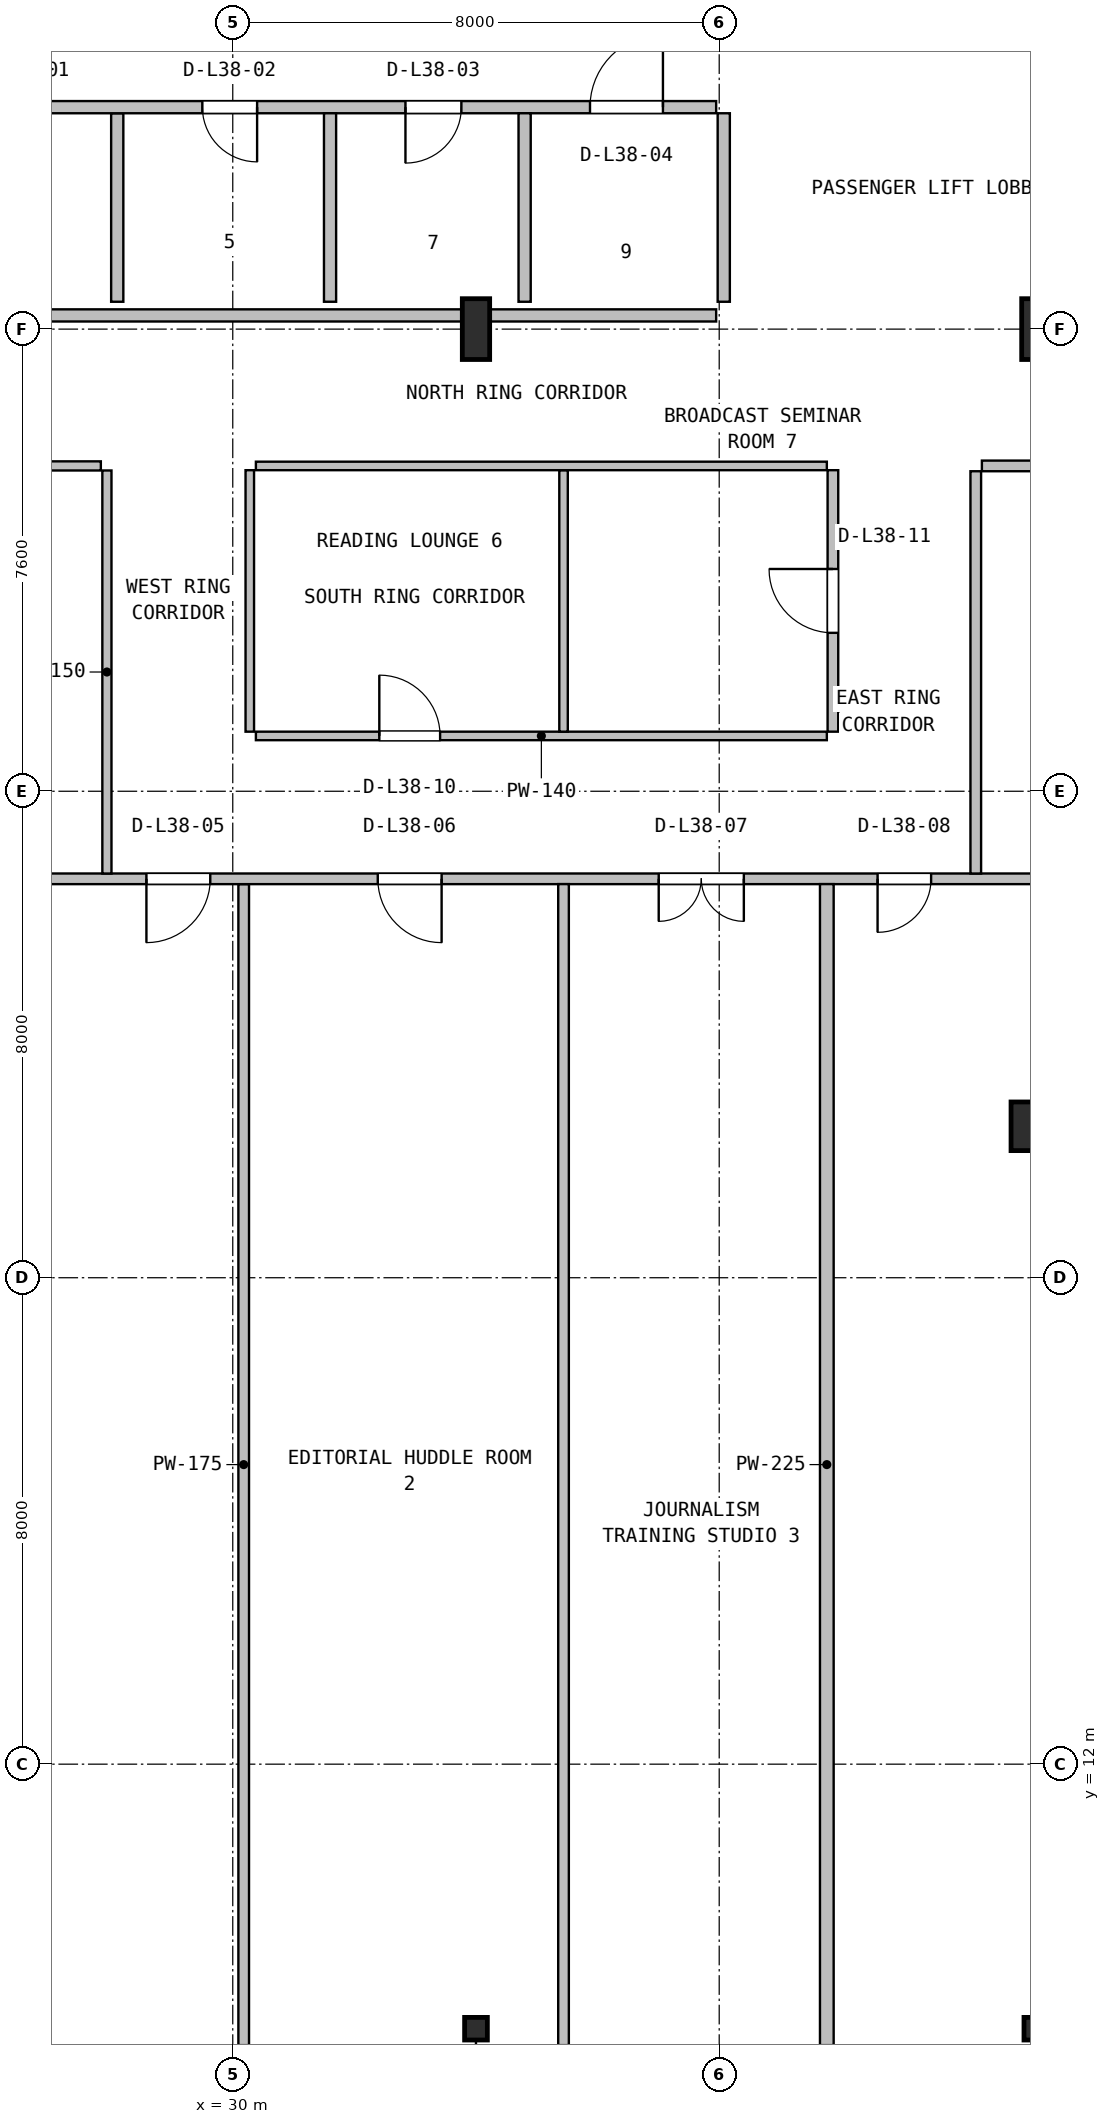
"""IFC4 building model, lengths in metres.
Left out: names, types, materials, properties, quantities, classifications, styles, units other than length and angle.
Written with IfcOpenShell. Run it as: python <this file> out.ifc"""

import sys

from ifc_helpers import new_model, si_unit, direction, frame, frame_2d, origin, origin_2d, place, context, subcontext, project, spatial, rectangle, i_section, extrude, source, transform, mapped, element, fill, save


model = new_model("IFC4")
c1 = context("Model", 3, precision=1e-05, world=origin(), true_north=direction((0.0, 1.0)))
c2 = subcontext(c1, "Body", "Model", "MODEL_VIEW")
j1 = project(units=[si_unit("LENGTHUNIT", "METRE"), si_unit("PLANEANGLEUNIT", "RADIAN")], contexts=[c1])
p1 = place(None, origin())
s1 = spatial("IfcSite", under=j1, at=p1, CompositionType="ELEMENT")
p2 = place(p1, origin())
s2 = spatial("IfcBuilding", under=s1, at=p2, CompositionType="ELEMENT")
p3 = place(p2, frame((0.0, 0.0, 157.2)))
s3 = spatial("IfcBuildingStorey", under=s2, at=p3, CompositionType="ELEMENT", Elevation=157.2)
m1 = source(origin(), c2, "Body", "SweptSolid", [
    extrude(i_section(OverallWidth=0.45, OverallDepth=1.0, WebThickness=0.016, FlangeThickness=0.03, FilletRadius=0.016, at=origin_2d()), origin(), (0.0, 0.0, 1.0), 3.8),
])
for number, where, z_axis, x_axis in (
    (1, (34.0, 35.6, 0.0), (0.0, 0.0, 1.0), (1.0, 0.0, 0.0)),
    (2, (43.2, 35.6, 0.0), (0.0, 0.0, 1.0), (1.0, 0.0, 0.0)),
):
    element("IfcColumn", number, at=place(p3, frame(where, z_axis=z_axis, x_axis=x_axis)), inside=s3, PredefinedType="COLUMN", context=c2, shape_type="MappedRepresentation", body=[
        mapped(m1, transform((0.0, 0.0, 0.0), x_axis=(1.0, 0.0, 0.0), y_axis=(0.0, 1.0, 0.0), z_axis=(0.0, 0.0, 1.0), scale=1.0)),
    ])
m2 = source(origin(), c2, "Body", "SweptSolid", [
    extrude(i_section(OverallWidth=0.374, OverallDepth=0.372, WebThickness=0.016, FlangeThickness=0.026, FilletRadius=0.016, at=origin_2d()), origin(), (0.0, 0.0, 1.0), 3.8),
])
for number, where, z_axis, x_axis in (
    (3, (34.0, 7.65, 0.0), (0.0, 0.0, 1.0), (1.0, 0.0, 0.0)),
    (4, (43.2, 7.65, 0.0), (0.0, 0.0, 1.0), (1.0, 0.0, 0.0)),
):
    element("IfcColumn", number, at=place(p3, frame(where, z_axis=z_axis, x_axis=x_axis)), inside=s3, PredefinedType="COLUMN", context=c2, shape_type="MappedRepresentation", body=[
        mapped(m2, transform((0.0, 0.0, 0.0), x_axis=(1.0, 0.0, 0.0), y_axis=(0.0, 1.0, 0.0), z_axis=(0.0, 0.0, 1.0), scale=1.0)),
    ])
m3 = source(origin(), c2, "Body", "SweptSolid", [
    extrude(rectangle(XDim=0.8, YDim=0.8, at=origin_2d()), origin(), (0.0, 0.0, 1.0), 3.8),
])
p4 = place(p3, frame((43.2, 22.49, 0.0), z_axis=(0.0, 0.0, 1.0), x_axis=(1.0, 0.0, 0.0)))
e5 = element("IfcColumn", 5, at=p4, inside=s3, PredefinedType="COLUMN", context=c2, shape_type="MappedRepresentation", body=[
    mapped(m3, transform((0.0, 0.0, 0.0), x_axis=(1.0, 0.0, 0.0), y_axis=(0.0, 1.0, 0.0), z_axis=(0.0, 0.0, 1.0), scale=1.0)),
])
p5 = place(p3, frame((25.0, 35.825, 0.0), z_axis=(0.0, 0.0, 1.0), x_axis=(1.0, 0.0, 0.0)))
e6 = element("IfcWall", 6, at=p5, inside=s3, PredefinedType="SOLIDWALL", context=c2, shape_type="SweptSolid", body=[
    extrude(rectangle(XDim=12.95, YDim=0.2, at=frame_2d((6.475, 0.0))), origin(), (0.0, 0.0, 1.0), 2.575),
])
p6 = place(p3, frame((28.1, 36.05, 0.0), z_axis=(0.0, 0.0, 1.0), x_axis=(0.0, 1.0, 0.0)))
e7 = element("IfcWall", 7, at=p6, inside=s3, PredefinedType="PLUMBINGWALL", context=c2, shape_type="SweptSolid", body=[
    extrude(rectangle(XDim=3.1, YDim=0.2, at=frame_2d((1.55, 0.0))), origin(), (0.0, 0.0, 1.0), 3.53),
])
p7 = place(p3, frame((25.0, 39.25, 0.0), z_axis=(0.0, 0.0, 1.0), x_axis=(1.0, 0.0, 0.0)))
e8 = element("IfcWall", 8, at=p7, inside=s3, PredefinedType="SOLIDWALL", context=c2, shape_type="SweptSolid", body=[
    extrude(rectangle(XDim=12.95, YDim=0.2, at=frame_2d((6.475, 0.0))), origin(), (0.0, 0.0, 1.0), 3.53),
])
p8 = place(p7, frame((1.1, 0.0, 0.0)))
e9 = element("IfcOpeningElement", 9, at=p8, cuts=e8, PredefinedType="OPENING", context=c2, shape_type="SweptSolid", body=[
    extrude(rectangle(XDim=0.9, YDim=2.06, at=frame_2d((0.45, 1.03))), frame((0.0, 0.11, 0.0), z_axis=(0.0, -1.0, 0.0), x_axis=(1.0, 0.0, 0.0)), (0.0, 0.0, 1.0), 0.22),
])
p9 = place(p7, frame((4.5, 0.0, 0.0)))
e10 = element("IfcOpeningElement", 10, at=p9, cuts=e8, PredefinedType="OPENING", context=c2, shape_type="SweptSolid", body=[
    extrude(rectangle(XDim=0.9, YDim=2.06, at=frame_2d((0.45, 1.03))), frame((0.0, 0.11, 0.0), z_axis=(0.0, -1.0, 0.0), x_axis=(1.0, 0.0, 0.0)), (0.0, 0.0, 1.0), 0.22),
])
p10 = place(p7, frame((7.84, 0.0, 0.0)))
e11 = element("IfcOpeningElement", 11, at=p10, cuts=e8, PredefinedType="OPENING", context=c2, shape_type="SweptSolid", body=[
    extrude(rectangle(XDim=0.92, YDim=2.08, at=frame_2d((0.46, 1.04))), frame((0.0, 0.11, 0.0), z_axis=(0.0, -1.0, 0.0), x_axis=(1.0, 0.0, 0.0)), (0.0, 0.0, 1.0), 0.22),
])
p11 = place(p7, frame((10.875, 0.0, 0.0)))
e12 = element("IfcOpeningElement", 12, at=p11, cuts=e8, PredefinedType="OPENING", context=c2, shape_type="SweptSolid", body=[
    extrude(rectangle(XDim=1.2, YDim=2.1, at=frame_2d((0.6, 1.05))), frame((0.0, 0.11, 0.0), z_axis=(0.0, -1.0, 0.0), x_axis=(1.0, 0.0, 0.0)), (0.0, 0.0, 1.0), 0.22),
])
p12 = place(p3, frame((31.6, 36.05, 0.0), z_axis=(0.0, 0.0, 1.0), x_axis=(0.0, 1.0, 0.0)))
e13 = element("IfcWall", 13, at=p12, inside=s3, PredefinedType="PLUMBINGWALL", context=c2, shape_type="SweptSolid", body=[
    extrude(rectangle(XDim=3.1, YDim=0.2, at=frame_2d((1.55, 0.0))), origin(), (0.0, 0.0, 1.0), 3.53),
])
for number, where, z_axis, x_axis in (
    (14, (34.8, 36.05, 0.0), (0.0, 0.0, 1.0), (0.0, 1.0, 0.0)),
    (15, (38.075, 36.05, 0.0), (0.0, 0.0, 1.0), (0.0, 1.0, 0.0)),
):
    element("IfcWall", number, at=place(p3, frame(where, z_axis=z_axis, x_axis=x_axis)), inside=s3, PredefinedType="SOLIDWALL", context=c2, shape_type="SweptSolid", body=[
        extrude(rectangle(XDim=3.1, YDim=0.2, at=frame_2d((1.55, 0.0))), origin(), (0.0, 0.0, 1.0), 3.53),
    ])
p13 = place(p3, frame((30.18, 7.38, 0.0), z_axis=(0.0, 0.0, 1.0), x_axis=(0.0, 1.0, 0.0)))
e16 = element("IfcWall", 16, at=p13, inside=s3, PredefinedType="PARTITIONING", context=c2, shape_type="SweptSolid", body=[
    extrude(rectangle(XDim=19.093, YDim=0.175, at=frame_2d((9.546, 0.0))), origin(), (0.0, 0.0, 1.0), 2.909),
])
p14 = place(p3, frame((7.18, 26.56, 0.0), z_axis=(0.0, 0.0, 1.0), x_axis=(1.0, 0.0, 0.0)))
e17 = element("IfcWall", 17, at=p14, inside=s3, PredefinedType="PARTITIONING", context=c2, shape_type="SweptSolid", body=[
    extrude(rectangle(XDim=53.64, YDim=0.175, at=frame_2d((26.82, 0.0))), origin(), (0.0, 0.0, 1.0), 2.909),
])
p15 = place(p14, frame((21.4, 0.0, 0.0)))
e18 = element("IfcOpeningElement", 18, at=p15, cuts=e17, PredefinedType="OPENING", context=c2, shape_type="SweptSolid", body=[
    extrude(rectangle(XDim=1.05, YDim=2.1, at=frame_2d((0.525, 1.05))), frame((0.0, 0.098, 0.0), z_axis=(0.0, -1.0, 0.0), x_axis=(1.0, 0.0, 0.0)), (0.0, 0.0, 1.0), 0.195),
])
p16 = place(p14, frame((25.205, 0.0, 0.0)))
e19 = element("IfcOpeningElement", 19, at=p16, cuts=e17, PredefinedType="OPENING", context=c2, shape_type="SweptSolid", body=[
    extrude(rectangle(XDim=1.05, YDim=2.1, at=frame_2d((0.525, 1.05))), frame((0.0, 0.098, 0.0), z_axis=(0.0, -1.0, 0.0), x_axis=(1.0, 0.0, 0.0)), (0.0, 0.0, 1.0), 0.195),
])
p17 = place(p14, frame((29.825, 0.0, 0.0)))
e20 = element("IfcOpeningElement", 20, at=p17, cuts=e17, PredefinedType="OPENING", context=c2, shape_type="SweptSolid", body=[
    extrude(rectangle(XDim=1.4, YDim=2.12, at=frame_2d((0.7, 1.06))), frame((0.0, 0.098, 0.0), z_axis=(0.0, -1.0, 0.0), x_axis=(1.0, 0.0, 0.0)), (0.0, 0.0, 1.0), 0.195),
])
p18 = place(p14, frame((33.425, 0.0, 0.0)))
e21 = element("IfcOpeningElement", 21, at=p18, cuts=e17, PredefinedType="OPENING", context=c2, shape_type="SweptSolid", body=[
    extrude(rectangle(XDim=0.88, YDim=2.06, at=frame_2d((0.44, 1.03))), frame((0.0, 0.098, 0.0), z_axis=(0.0, -1.0, 0.0), x_axis=(1.0, 0.0, 0.0)), (0.0, 0.0, 1.0), 0.195),
])
p19 = place(p3, frame((35.44, 7.38, 0.0), z_axis=(0.0, 0.0, 1.0), x_axis=(0.0, 1.0, 0.0)))
e22 = element("IfcWall", 22, at=p19, inside=s3, PredefinedType="PARTITIONING", context=c2, shape_type="SweptSolid", body=[
    extrude(rectangle(XDim=19.093, YDim=0.175, at=frame_2d((9.546, 0.0))), origin(), (0.0, 0.0, 1.0), 2.909),
])
p20 = place(p3, frame((39.77, 7.38, 0.0), z_axis=(0.0, 0.0, 1.0), x_axis=(0.0, 1.0, 0.0)))
e23 = element("IfcWall", 23, at=p20, inside=s3, PredefinedType="PARTITIONING", context=c2, shape_type="SweptSolid", body=[
    extrude(rectangle(XDim=19.093, YDim=0.225, at=frame_2d((9.546, 0.0))), origin(), (0.0, 0.0, 1.0), 2.909),
])
p21 = place(p3, frame((27.93, 26.647, 0.0), z_axis=(0.0, 0.0, 1.0), x_axis=(0.0, 1.0, 0.0)))
e24 = element("IfcWall", 24, at=p21, inside=s3, PredefinedType="PARTITIONING", context=c2, shape_type="SweptSolid", body=[
    extrude(rectangle(XDim=6.628, YDim=0.15, at=frame_2d((3.314, 0.0))), origin(), (0.0, 0.0, 1.0), 3.222),
])
p22 = place(p3, frame((7.18, 33.35, 0.0), z_axis=(0.0, 0.0, 1.0), x_axis=(1.0, 0.0, 0.0)))
e25 = element("IfcWall", 25, at=p22, inside=s3, PredefinedType="PARTITIONING", context=c2, shape_type="SweptSolid", body=[
    extrude(rectangle(XDim=20.65, YDim=0.15, at=frame_2d((10.325, 0.0))), origin(), (0.0, 0.0, 1.0), 2.909),
])
p23 = place(p22, frame((11.8, 0.0, 0.0)))
e26 = element("IfcOpeningElement", 26, at=p23, cuts=e25, PredefinedType="OPENING", context=c2, shape_type="SweptSolid", body=[
    extrude(rectangle(XDim=0.92, YDim=2.08, at=frame_2d((0.46, 1.04))), frame((0.0, 0.085, 0.0), z_axis=(0.0, -1.0, 0.0), x_axis=(1.0, 0.0, 0.0)), (0.0, 0.0, 1.0), 0.17),
])
p24 = place(p3, frame((30.38, 28.91, 0.0), z_axis=(0.0, 0.0, 1.0), x_axis=(1.0, 0.0, 0.0)))
e27 = element("IfcWall", 27, at=p24, inside=s3, PredefinedType="PARTITIONING", context=c2, shape_type="SweptSolid", body=[
    extrude(rectangle(XDim=9.39, YDim=0.14, at=frame_2d((4.695, 0.0))), origin(), (0.0, 0.0, 1.0), 2.909),
])
p25 = place(p24, frame((2.03, 0.0, 0.0)))
e28 = element("IfcOpeningElement", 28, at=p25, cuts=e27, PredefinedType="OPENING", context=c2, shape_type="SweptSolid", body=[
    extrude(rectangle(XDim=1.0, YDim=2.1, at=frame_2d((0.5, 1.05))), frame((0.0, 0.08, 0.0), z_axis=(0.0, -1.0, 0.0), x_axis=(1.0, 0.0, 0.0)), (0.0, 0.0, 1.0), 0.16),
])
p26 = place(p3, frame((35.44, 28.98, 0.0), z_axis=(0.0, 0.0, 1.0), x_axis=(0.0, 1.0, 0.0)))
e29 = element("IfcWall", 29, at=p26, inside=s3, PredefinedType="PARTITIONING", context=c2, shape_type="SweptSolid", body=[
    extrude(rectangle(XDim=4.3, YDim=0.14, at=frame_2d((2.15, 0.0))), origin(), (0.0, 0.0, 1.0), 3.222),
])
p27 = place(p3, frame((30.38, 33.35, 0.0), z_axis=(0.0, 0.0, 1.0), x_axis=(1.0, 0.0, 0.0)))
e30 = element("IfcWall", 30, at=p27, inside=s3, PredefinedType="PARTITIONING", context=c2, shape_type="SweptSolid", body=[
    extrude(rectangle(XDim=9.39, YDim=0.14, at=frame_2d((4.695, 0.0))), origin(), (0.0, 0.0, 1.0), 2.909),
])
p28 = place(p3, frame((30.28, 28.98, 0.0), z_axis=(0.0, 0.0, 1.0), x_axis=(0.0, 1.0, 0.0)))
e31 = element("IfcWall", 31, at=p28, inside=s3, PredefinedType="PARTITIONING", context=c2, shape_type="SweptSolid", body=[
    extrude(rectangle(XDim=4.3, YDim=0.14, at=frame_2d((2.15, 0.0))), origin(), (0.0, 0.0, 1.0), 3.222),
])
p29 = place(p3, frame((39.87, 28.98, 0.0), z_axis=(0.0, 0.0, 1.0), x_axis=(0.0, 1.0, 0.0)))
e32 = element("IfcWall", 32, at=p29, inside=s3, PredefinedType="PARTITIONING", context=c2, shape_type="SweptSolid", body=[
    extrude(rectangle(XDim=4.3, YDim=0.175, at=frame_2d((2.15, 0.0))), origin(), (0.0, 0.0, 1.0), 3.222),
])
p30 = place(p29, frame((1.625, 0.0, 0.0)))
e33 = element("IfcOpeningElement", 33, at=p30, cuts=e32, PredefinedType="OPENING", context=c2, shape_type="SweptSolid", body=[
    extrude(rectangle(XDim=1.05, YDim=2.1, at=frame_2d((0.525, 1.05))), frame((0.0, 0.098, 0.0), z_axis=(0.0, -1.0, 0.0), x_axis=(1.0, 0.0, 0.0)), (0.0, 0.0, 1.0), 0.195),
])
p31 = place(p3, frame((42.32, 33.35, 0.0), z_axis=(0.0, 0.0, 1.0), x_axis=(1.0, 0.0, 0.0)))
e34 = element("IfcWall", 34, at=p31, inside=s3, PredefinedType="PARTITIONING", context=c2, shape_type="SweptSolid", body=[
    extrude(rectangle(XDim=18.5, YDim=0.175, at=frame_2d((9.25, 0.0))), origin(), (0.0, 0.0, 1.0), 2.909),
])
p32 = place(p31, frame((6.79, 0.0, 0.0)))
e35 = element("IfcOpeningElement", 35, at=p32, cuts=e34, PredefinedType="OPENING", context=c2, shape_type="SweptSolid", body=[
    extrude(rectangle(XDim=1.05, YDim=2.1, at=frame_2d((0.525, 1.05))), frame((0.0, 0.098, 0.0), z_axis=(0.0, -1.0, 0.0), x_axis=(1.0, 0.0, 0.0)), (0.0, 0.0, 1.0), 0.195),
])
p33 = place(p3, frame((42.22, 26.647, 0.0), z_axis=(0.0, 0.0, 1.0), x_axis=(0.0, 1.0, 0.0)))
e36 = element("IfcWall", 36, at=p33, inside=s3, PredefinedType="PARTITIONING", context=c2, shape_type="SweptSolid", body=[
    extrude(rectangle(XDim=6.616, YDim=0.175, at=frame_2d((3.308, 0.0))), origin(), (0.0, 0.0, 1.0), 3.222),
])
m4 = source(origin(), c2, "Body", "SweptSolid", [
    extrude(rectangle(XDim=0.9, YDim=2.06, at=frame_2d((0.45, 1.03))), frame((0.0, 0.025, 0.0), z_axis=(0.0, -1.0, 0.0), x_axis=(1.0, 0.0, 0.0)), (0.0, 0.0, 1.0), 0.05),
])
p34 = place(p9, frame((0.9, 0.0, 0.0), z_axis=(0.0, 0.0, 1.0), x_axis=(-1.0, 0.0, 0.0)))
e37 = element("IfcDoor", 37, at=p34, inside=s3, OperationType="SINGLE_SWING_RIGHT", PredefinedType="DOOR", context=c2, shape_type="MappedRepresentation", body=[
    mapped(m4, transform((0.0, 0.0, 0.0), x_axis=(1.0, 0.0, 0.0), y_axis=(0.0, 1.0, 0.0), z_axis=(0.0, 0.0, 1.0), scale=1.0)),
])
fill(e10, e37)
m5 = source(origin(), c2, "Body", "SweptSolid", [
    extrude(rectangle(XDim=0.92, YDim=2.08, at=frame_2d((0.46, 1.04))), frame((0.0, 0.025, 0.0), z_axis=(0.0, -1.0, 0.0), x_axis=(1.0, 0.0, 0.0)), (0.0, 0.0, 1.0), 0.05),
])
p35 = place(p10, frame((0.92, 0.0, 0.0), z_axis=(0.0, 0.0, 1.0), x_axis=(-1.0, 0.0, 0.0)))
e38 = element("IfcDoor", 38, at=p35, inside=s3, OperationType="SINGLE_SWING_LEFT", PredefinedType="DOOR", context=c2, shape_type="MappedRepresentation", body=[
    mapped(m5, transform((0.0, 0.0, 0.0), x_axis=(1.0, 0.0, 0.0), y_axis=(0.0, 1.0, 0.0), z_axis=(0.0, 0.0, 1.0), scale=1.0)),
])
fill(e11, e38)
m6 = source(origin(), c2, "Body", "SweptSolid", [
    extrude(rectangle(XDim=1.2, YDim=2.1, at=frame_2d((0.6, 1.05))), frame((0.0, 0.025, 0.0), z_axis=(0.0, -1.0, 0.0), x_axis=(1.0, 0.0, 0.0)), (0.0, 0.0, 1.0), 0.05),
])
p36 = place(p11, origin())
e39 = element("IfcDoor", 39, at=p36, inside=s3, OperationType="SINGLE_SWING_RIGHT", PredefinedType="DOOR", context=c2, shape_type="MappedRepresentation", body=[
    mapped(m6, transform((0.0, 0.0, 0.0), x_axis=(1.0, 0.0, 0.0), y_axis=(0.0, 1.0, 0.0), z_axis=(0.0, 0.0, 1.0), scale=1.0)),
])
fill(e12, e39)
m7 = source(origin(), c2, "Body", "SweptSolid", [
    extrude(rectangle(XDim=1.05, YDim=2.1, at=frame_2d((0.525, 1.05))), frame((0.0, 0.025, 0.0), z_axis=(0.0, -1.0, 0.0), x_axis=(1.0, 0.0, 0.0)), (0.0, 0.0, 1.0), 0.05),
])
p37 = place(p15, frame((1.05, 0.0, 0.0), z_axis=(0.0, 0.0, 1.0), x_axis=(-1.0, 0.0, 0.0)))
e40 = element("IfcDoor", 40, at=p37, inside=s3, OperationType="SINGLE_SWING_LEFT", PredefinedType="DOOR", context=c2, shape_type="MappedRepresentation", body=[
    mapped(m7, transform((0.0, 0.0, 0.0), x_axis=(1.0, 0.0, 0.0), y_axis=(0.0, 1.0, 0.0), z_axis=(0.0, 0.0, 1.0), scale=1.0)),
])
fill(e18, e40)
p38 = place(p16, frame((1.05, 0.0, 0.0), z_axis=(0.0, 0.0, 1.0), x_axis=(-1.0, 0.0, 0.0)))
e41 = element("IfcDoor", 41, at=p38, inside=s3, OperationType="SINGLE_SWING_RIGHT", PredefinedType="DOOR", context=c2, shape_type="MappedRepresentation", body=[
    mapped(m7, transform((0.0, 0.0, 0.0), x_axis=(1.0, 0.0, 0.0), y_axis=(0.0, 1.0, 0.0), z_axis=(0.0, 0.0, 1.0), scale=1.0)),
])
fill(e19, e41)
m8 = source(origin(), c2, "Body", "SweptSolid", [
    extrude(rectangle(XDim=1.4, YDim=2.12, at=frame_2d((0.7, 1.06))), frame((0.0, 0.025, 0.0), z_axis=(0.0, -1.0, 0.0), x_axis=(1.0, 0.0, 0.0)), (0.0, 0.0, 1.0), 0.05),
])
p39 = place(p17, frame((1.4, 0.0, 0.0), z_axis=(0.0, 0.0, 1.0), x_axis=(-1.0, 0.0, 0.0)))
e42 = element("IfcDoor", 42, at=p39, inside=s3, OperationType="DOUBLE_DOOR_SINGLE_SWING", PredefinedType="DOOR", context=c2, shape_type="MappedRepresentation", body=[
    mapped(m8, transform((0.0, 0.0, 0.0), x_axis=(1.0, 0.0, 0.0), y_axis=(0.0, 1.0, 0.0), z_axis=(0.0, 0.0, 1.0), scale=1.0)),
])
fill(e20, e42)
m9 = source(origin(), c2, "Body", "SweptSolid", [
    extrude(rectangle(XDim=0.88, YDim=2.06, at=frame_2d((0.44, 1.03))), frame((0.0, 0.025, 0.0), z_axis=(0.0, -1.0, 0.0), x_axis=(1.0, 0.0, 0.0)), (0.0, 0.0, 1.0), 0.05),
])
p40 = place(p18, frame((0.88, 0.0, 0.0), z_axis=(0.0, 0.0, 1.0), x_axis=(-1.0, 0.0, 0.0)))
e43 = element("IfcDoor", 43, at=p40, inside=s3, OperationType="SINGLE_SWING_LEFT", PredefinedType="DOOR", context=c2, shape_type="MappedRepresentation", body=[
    mapped(m9, transform((0.0, 0.0, 0.0), x_axis=(1.0, 0.0, 0.0), y_axis=(0.0, 1.0, 0.0), z_axis=(0.0, 0.0, 1.0), scale=1.0)),
])
fill(e21, e43)
m10 = source(origin(), c2, "Body", "SweptSolid", [
    extrude(rectangle(XDim=1.0, YDim=2.1, at=frame_2d((0.5, 1.05))), frame((0.0, 0.025, 0.0), z_axis=(0.0, -1.0, 0.0), x_axis=(1.0, 0.0, 0.0)), (0.0, 0.0, 1.0), 0.05),
])
p41 = place(p25, origin())
e44 = element("IfcDoor", 44, at=p41, inside=s3, OperationType="SINGLE_SWING_LEFT", PredefinedType="DOOR", context=c2, shape_type="MappedRepresentation", body=[
    mapped(m10, transform((0.0, 0.0, 0.0), x_axis=(1.0, 0.0, 0.0), y_axis=(0.0, 1.0, 0.0), z_axis=(0.0, 0.0, 1.0), scale=1.0)),
])
fill(e28, e44)
p42 = place(p30, origin())
e45 = element("IfcDoor", 45, at=p42, inside=s3, OperationType="SINGLE_SWING_RIGHT", PredefinedType="DOOR", context=c2, shape_type="MappedRepresentation", body=[
    mapped(m7, transform((0.0, 0.0, 0.0), x_axis=(1.0, 0.0, 0.0), y_axis=(0.0, 1.0, 0.0), z_axis=(0.0, 0.0, 1.0), scale=1.0)),
])
fill(e33, e45)
save(model, sys.argv[1])
